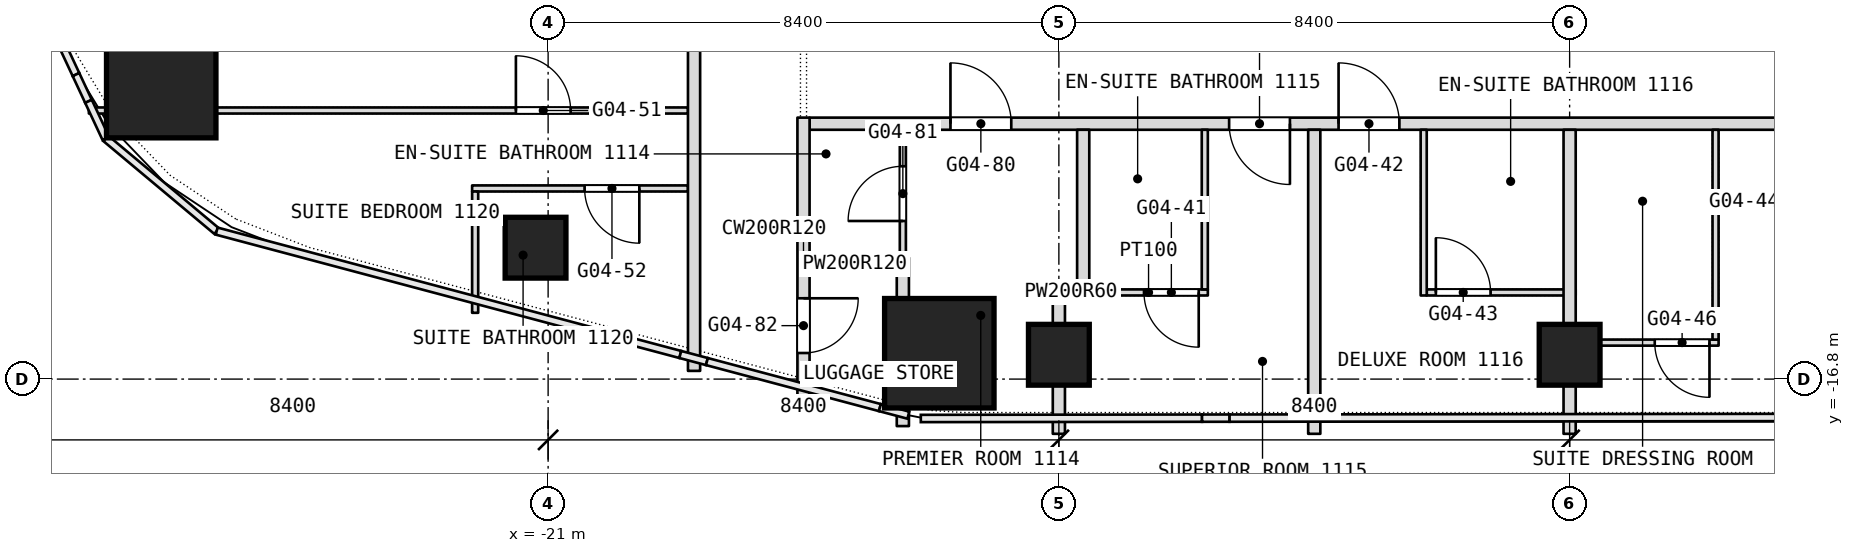
"""IFC4 building model, lengths in metres.
Left out: names, types, materials, properties, quantities, classifications, styles, units other than length and angle.
Written with IfcOpenShell. Run it as: python <this file> out.ifc"""

import sys

from ifc_helpers import new_model, si_unit, direction, frame, frame_2d, origin, origin_2d, place, context, subcontext, project, spatial, rectangle, extrude, element, fill, save


model = new_model("IFC4")
c1 = context("Model", 3, precision=1e-05, world=origin(), true_north=direction((0.0, 1.0)))
c2 = subcontext(c1, "Body", "Model", "MODEL_VIEW")
j1 = project(units=[si_unit("LENGTHUNIT", "METRE"), si_unit("PLANEANGLEUNIT", "RADIAN")], contexts=[c1])
p1 = place(None, origin())
s1 = spatial("IfcSite", under=j1, at=p1, CompositionType="ELEMENT")
p2 = place(p1, origin())
s2 = spatial("IfcBuilding", under=s1, at=p2, CompositionType="ELEMENT")
p3 = place(p2, frame((0.0, 0.0, 54.5)))
s3 = spatial("IfcBuildingStorey", under=s2, at=p3, CompositionType="ELEMENT", Elevation=54.5)
for number, where, z_axis, x_axis in (
    (1, (-27.363, -11.933, 0.0), (0.0, 0.0, 1.0), (1.0, 0.0, 0.0)),
    (2, (-14.566, -16.375, 0.0), (0.0, 0.0, 1.0), (1.0, 0.0, 0.0)),
):
    element("IfcColumn", number, at=place(p3, frame(where, z_axis=z_axis, x_axis=x_axis)), inside=s3, PredefinedType="COLUMN", context=c2, shape_type="SweptSolid", body=[
        extrude(rectangle(XDim=1.8, YDim=1.8, at=origin_2d()), origin(), (0.0, 0.0, 1.0), 3.6),
    ])
for number, where, z_axis, x_axis in (
    (3, (-4.2, -16.4, 0.0), (0.0, 0.0, 1.0), (1.0, 0.0, 0.0)),
    (4, (-12.6, -16.4, 0.0), (0.0, 0.0, 1.0), (1.0, 0.0, 0.0)),
    (5, (-21.207, -14.639, 0.0), (0.0, 0.0, 1.0), (1.0, 0.0, 0.0)),
):
    element("IfcColumn", number, at=place(p3, frame(where, z_axis=z_axis, x_axis=x_axis)), inside=s3, PredefinedType="COLUMN", context=c2, shape_type="SweptSolid", body=[
        extrude(rectangle(XDim=1.0, YDim=1.0, at=origin_2d()), origin(), (0.0, 0.0, 1.0), 3.6),
    ])
p4 = place(p3, frame((-4.1, -16.2, 0.0), z_axis=(0.0, 0.0, 1.0), x_axis=(1.0, 0.0, 0.0)))
e6 = element("IfcWall", 6, at=p4, inside=s3, PredefinedType="PARTITIONING", context=c2, shape_type="SweptSolid", body=[
    extrude(rectangle(XDim=2.35, YDim=0.1, at=frame_2d((1.175, 0.0))), origin(), (0.0, 0.0, 1.0), 2.94),
])
p5 = place(p4, frame((1.3, 0.0, 0.0)))
e7 = element("IfcOpeningElement", 7, at=p5, cuts=e6, PredefinedType="OPENING", context=c2, shape_type="SweptSolid", body=[
    extrude(rectangle(XDim=0.9, YDim=2.1, at=frame_2d((0.45, 1.05))), frame((0.0, 0.05, 0.0), z_axis=(0.0, -1.0, 0.0), x_axis=(1.0, 0.0, 0.0)), (0.0, 0.0, 1.0), 0.1),
])
p6 = place(p3, frame((-12.7, -15.375, 0.0), z_axis=(0.0, 0.0, 1.0), x_axis=(1.0, 0.0, 0.0)))
e8 = element("IfcWall", 8, at=p6, inside=s3, PredefinedType="PARTITIONING", context=c2, shape_type="SweptSolid", body=[
    extrude(rectangle(XDim=0.6, YDim=0.2, at=frame_2d((0.3, 0.0))), origin(), (0.0, 0.0, 1.0), 3.34),
])
p7 = place(p3, frame((-12.1, -15.375, 0.0), z_axis=(0.0, 0.0, 1.0), x_axis=(1.0, 0.0, 0.0)))
e9 = element("IfcWall", 9, at=p7, inside=s3, PredefinedType="PARTITIONING", context=c2, shape_type="SweptSolid", body=[
    extrude(rectangle(XDim=1.95, YDim=0.1, at=frame_2d((0.975, 0.0))), origin(), (0.0, 0.0, 1.0), 3.34),
])
p8 = place(p7, frame((0.9, 0.0, 0.0)))
e10 = element("IfcOpeningElement", 10, at=p8, cuts=e9, PredefinedType="OPENING", context=c2, shape_type="SweptSolid", body=[
    extrude(rectangle(XDim=0.9, YDim=2.1, at=frame_2d((0.45, 1.05))), frame((0.0, 0.05, 0.0), z_axis=(0.0, -1.0, 0.0), x_axis=(1.0, 0.0, 0.0)), (0.0, 0.0, 1.0), 0.1),
])
p9 = place(p3, frame((-6.55, -15.375, 0.0), z_axis=(0.0, 0.0, 1.0), x_axis=(1.0, 0.0, 0.0)))
e11 = element("IfcWall", 11, at=p9, inside=s3, PredefinedType="PARTITIONING", context=c2, shape_type="SweptSolid", body=[
    extrude(rectangle(XDim=2.45, YDim=0.1, at=frame_2d((1.225, 0.0))), origin(), (0.0, 0.0, 1.0), 3.34),
])
p10 = place(p9, frame((0.15, 0.0, 0.0)))
e12 = element("IfcOpeningElement", 12, at=p10, cuts=e11, PredefinedType="OPENING", context=c2, shape_type="SweptSolid", body=[
    extrude(rectangle(XDim=0.9, YDim=2.1, at=frame_2d((0.45, 1.05))), frame((0.0, 0.05, 0.0), z_axis=(0.0, -1.0, 0.0), x_axis=(1.0, 0.0, 0.0)), (0.0, 0.0, 1.0), 0.1),
])
p11 = place(p3, frame((-16.7, -14.9, 0.0), z_axis=(0.0, 0.0, 1.0), x_axis=(1.0, 0.0, 0.0)))
e13 = element("IfcWall", 13, at=p11, inside=s3, PredefinedType="PARTITIONING", context=c2, shape_type="SweptSolid", body=[
    extrude(rectangle(XDim=1.484, YDim=0.2, at=frame_2d((0.742, 0.0))), origin(), (0.0, 0.0, 1.0), 3.34),
])
p12 = place(p3, frame((-22.25, -13.665, 0.0), z_axis=(0.0, 0.0, 1.0), x_axis=(1.0, 0.0, 0.0)))
e14 = element("IfcWall", 14, at=p12, inside=s3, PredefinedType="PARTITIONING", context=c2, shape_type="SweptSolid", body=[
    extrude(rectangle(XDim=3.55, YDim=0.1, at=frame_2d((1.775, 0.0))), origin(), (0.0, 0.0, 1.0), 3.34),
])
p13 = place(p12, frame((1.85, 0.0, 0.0)))
e15 = element("IfcOpeningElement", 15, at=p13, cuts=e14, PredefinedType="OPENING", context=c2, shape_type="SweptSolid", body=[
    extrude(rectangle(XDim=0.9, YDim=2.1, at=frame_2d((0.45, 1.05))), frame((0.0, 0.05, 0.0), z_axis=(0.0, -1.0, 0.0), x_axis=(1.0, 0.0, 0.0)), (0.0, 0.0, 1.0), 0.1),
])
p14 = place(p3, frame((-16.7, -12.6, 0.0), z_axis=(0.0, 0.0, 1.0), x_axis=(1.0, 0.0, 0.0)))
e16 = element("IfcWall", 16, at=p14, inside=s3, PredefinedType="PARTITIONING", context=c2, shape_type="SweptSolid", body=[
    extrude(rectangle(XDim=33.4, YDim=0.2, at=frame_2d((16.7, 0.0))), origin(), (0.0, 0.0, 1.0), 3.34),
])
p15 = place(p14, frame((6.9, 0.0, 0.0)))
e17 = element("IfcOpeningElement", 17, at=p15, cuts=e16, PredefinedType="OPENING", context=c2, shape_type="SweptSolid", body=[
    extrude(rectangle(XDim=1.0, YDim=2.1, at=frame_2d((0.5, 1.05))), frame((0.0, 0.1, 0.0), z_axis=(0.0, -1.0, 0.0), x_axis=(1.0, 0.0, 0.0)), (0.0, 0.0, 1.0), 0.2),
])
p16 = place(p14, frame((8.7, 0.0, 0.0)))
e18 = element("IfcOpeningElement", 18, at=p16, cuts=e16, PredefinedType="OPENING", context=c2, shape_type="SweptSolid", body=[
    extrude(rectangle(XDim=1.0, YDim=2.1, at=frame_2d((0.5, 1.05))), frame((0.0, 0.1, 0.0), z_axis=(0.0, -1.0, 0.0), x_axis=(1.0, 0.0, 0.0)), (0.0, 0.0, 1.0), 0.2),
])
p17 = place(p14, frame((16.1, 0.0, 0.0)))
e19 = element("IfcOpeningElement", 19, at=p17, cuts=e16, PredefinedType="OPENING", context=c2, shape_type="SweptSolid", body=[
    extrude(rectangle(XDim=1.1, YDim=2.1, at=frame_2d((0.55, 1.05))), frame((0.0, 0.1, 0.0), z_axis=(0.0, -1.0, 0.0), x_axis=(1.0, 0.0, 0.0)), (0.0, 0.0, 1.0), 0.2),
])
p18 = place(p14, frame((24.6, 0.0, 0.0)))
e20 = element("IfcOpeningElement", 20, at=p18, cuts=e16, PredefinedType="OPENING", context=c2, shape_type="SweptSolid", body=[
    extrude(rectangle(XDim=1.1, YDim=2.1, at=frame_2d((0.55, 1.05))), frame((0.0, 0.1, 0.0), z_axis=(0.0, -1.0, 0.0), x_axis=(1.0, 0.0, 0.0)), (0.0, 0.0, 1.0), 0.2),
])
p19 = place(p14, frame((2.317, 0.0, 0.0)))
e21 = element("IfcOpeningElement", 21, at=p19, cuts=e16, PredefinedType="OPENING", context=c2, shape_type="SweptSolid", body=[
    extrude(rectangle(XDim=1.0, YDim=2.1, at=frame_2d((0.5, 1.05))), frame((0.0, 0.1, 0.0), z_axis=(0.0, -1.0, 0.0), x_axis=(1.0, 0.0, 0.0)), (0.0, 0.0, 1.0), 0.2),
])
p20 = place(p14, frame((30.033, 0.0, 0.0)))
e22 = element("IfcOpeningElement", 22, at=p20, cuts=e16, PredefinedType="OPENING", context=c2, shape_type="SweptSolid", body=[
    extrude(rectangle(XDim=1.0, YDim=2.1, at=frame_2d((0.5, 1.05))), frame((0.0, 0.1, 0.0), z_axis=(0.0, -1.0, 0.0), x_axis=(1.0, 0.0, 0.0)), (0.0, 0.0, 1.0), 0.2),
])
p21 = place(p3, frame((-28.553, -12.383, 0.0), z_axis=(0.0, 0.0, 1.0), x_axis=(1.0, 0.0, 0.0)))
e23 = element("IfcWall", 23, at=p21, inside=s3, PredefinedType="PARTITIONING", context=c2, shape_type="SweptSolid", body=[
    extrude(rectangle(XDim=0.29, YDim=0.1, at=frame_2d((0.145, 0.0))), origin(), (0.0, 0.0, 1.0), 3.34),
])
p22 = place(p3, frame((-26.463, -12.383, 0.0), z_axis=(0.0, 0.0, 1.0), x_axis=(1.0, 0.0, 0.0)))
e24 = element("IfcWall", 24, at=p22, inside=s3, PredefinedType="PARTITIONING", context=c2, shape_type="SweptSolid", body=[
    extrude(rectangle(XDim=7.763, YDim=0.1, at=frame_2d((3.881, 0.0))), origin(), (0.0, 0.0, 1.0), 3.34),
])
p23 = place(p22, frame((4.933, 0.0, 0.0)))
e25 = element("IfcOpeningElement", 25, at=p23, cuts=e24, PredefinedType="OPENING", context=c2, shape_type="SweptSolid", body=[
    extrude(rectangle(XDim=0.9, YDim=2.1, at=frame_2d((0.45, 1.05))), frame((0.0, 0.05, 0.0), z_axis=(0.0, -1.0, 0.0), x_axis=(1.0, 0.0, 0.0)), (0.0, 0.0, 1.0), 0.1),
])
p24 = place(p3, frame((-1.8, -16.15, 0.0), z_axis=(0.0, 0.0, 1.0), x_axis=(0.0, 1.0, 0.0)))
e26 = element("IfcWall", 26, at=p24, inside=s3, PredefinedType="PARTITIONING", context=c2, shape_type="SweptSolid", body=[
    extrude(rectangle(XDim=3.45, YDim=0.1, at=frame_2d((1.725, 0.0))), origin(), (0.0, 0.0, 1.0), 3.34),
])
p25 = place(p3, frame((-4.2, -17.7, 0.0), z_axis=(0.0, 0.0, 1.0), x_axis=(0.0, 1.0, 0.0)))
e27 = element("IfcWall", 27, at=p25, inside=s3, PredefinedType="PARTITIONING", context=c2, shape_type="SweptSolid", body=[
    extrude(rectangle(XDim=5.0, YDim=0.2, at=frame_2d((2.5, 0.0))), origin(), (0.0, 0.0, 1.0), 3.34),
])
p26 = place(p3, frame((-6.6, -15.425, 0.0), z_axis=(0.0, 0.0, 1.0), x_axis=(0.0, 1.0, 0.0)))
e28 = element("IfcWall", 28, at=p26, inside=s3, PredefinedType="PARTITIONING", context=c2, shape_type="SweptSolid", body=[
    extrude(rectangle(XDim=2.725, YDim=0.1, at=frame_2d((1.363, 0.0))), origin(), (0.0, 0.0, 1.0), 3.34),
])
p27 = place(p3, frame((-8.4, -17.7, 0.0), z_axis=(0.0, 0.0, 1.0), x_axis=(0.0, 1.0, 0.0)))
e29 = element("IfcWall", 29, at=p27, inside=s3, PredefinedType="PARTITIONING", context=c2, shape_type="SweptSolid", body=[
    extrude(rectangle(XDim=5.0, YDim=0.2, at=frame_2d((2.5, 0.0))), origin(), (0.0, 0.0, 1.0), 3.34),
])
p28 = place(p3, frame((-10.2, -15.325, 0.0), z_axis=(0.0, 0.0, 1.0), x_axis=(0.0, 1.0, 0.0)))
e30 = element("IfcWall", 30, at=p28, inside=s3, PredefinedType="PARTITIONING", context=c2, shape_type="SweptSolid", body=[
    extrude(rectangle(XDim=2.625, YDim=0.1, at=frame_2d((1.312, 0.0))), origin(), (0.0, 0.0, 1.0), 3.34),
])
p29 = place(p3, frame((-12.2, -15.275, 0.0), z_axis=(0.0, 0.0, 1.0), x_axis=(0.0, 1.0, 0.0)))
e31 = element("IfcWall", 31, at=p29, inside=s3, PredefinedType="PARTITIONING", context=c2, shape_type="SweptSolid", body=[
    extrude(rectangle(XDim=2.575, YDim=0.2, at=frame_2d((1.288, 0.0))), origin(), (0.0, 0.0, 1.0), 3.34),
])
p30 = place(p3, frame((-12.6, -17.7, 0.0), z_axis=(0.0, 0.0, 1.0), x_axis=(0.0, 1.0, 0.0)))
e32 = element("IfcWall", 32, at=p30, inside=s3, PredefinedType="PARTITIONING", context=c2, shape_type="SweptSolid", body=[
    extrude(rectangle(XDim=2.225, YDim=0.2, at=frame_2d((1.112, 0.0))), origin(), (0.0, 0.0, 1.0), 3.34),
])
p31 = place(p3, frame((-15.166, -17.573, 0.0), z_axis=(0.0, 0.0, 1.0), x_axis=(0.0, 1.0, 0.0)))
e33 = element("IfcWall", 33, at=p31, inside=s3, PredefinedType="PARTITIONING", context=c2, shape_type="SweptSolid", body=[
    extrude(rectangle(XDim=0.298, YDim=0.2, at=frame_2d((0.149, 0.0))), origin(), (0.0, 0.0, 1.0), 3.34),
])
p32 = place(p3, frame((-15.166, -15.475, 0.0), z_axis=(0.0, 0.0, 1.0), x_axis=(0.0, 1.0, 0.0)))
e34 = element("IfcWall", 34, at=p32, inside=s3, PredefinedType="PARTITIONING", context=c2, shape_type="SweptSolid", body=[
    extrude(rectangle(XDim=0.675, YDim=0.2, at=frame_2d((0.337, 0.0))), origin(), (0.0, 0.0, 1.0), 3.34),
])
p33 = place(p3, frame((-15.166, -15.0, 0.0), z_axis=(0.0, 0.0, 1.0), x_axis=(0.0, 1.0, 0.0)))
e35 = element("IfcWall", 35, at=p33, inside=s3, PredefinedType="PARTITIONING", context=c2, shape_type="SweptSolid", body=[
    extrude(rectangle(XDim=2.3, YDim=0.1, at=frame_2d((1.15, 0.0))), origin(), (0.0, 0.0, 1.0), 3.34),
])
p34 = place(p33, frame((0.8, 0.0, 0.0)))
e36 = element("IfcOpeningElement", 36, at=p34, cuts=e35, PredefinedType="OPENING", context=c2, shape_type="SweptSolid", body=[
    extrude(rectangle(XDim=0.9, YDim=2.1, at=frame_2d((0.45, 1.05))), frame((0.0, 0.05, 0.0), z_axis=(0.0, -1.0, 0.0), x_axis=(1.0, 0.0, 0.0)), (0.0, 0.0, 1.0), 0.1),
])
p35 = place(p3, frame((-16.8, -17.143, 0.0), z_axis=(0.0, 0.0, 1.0), x_axis=(0.0, 1.0, 0.0)))
e37 = element("IfcWall", 37, at=p35, inside=s3, PredefinedType="PARTITIONING", context=c2, shape_type="SweptSolid", body=[
    extrude(rectangle(XDim=4.643, YDim=0.2, at=frame_2d((2.322, 0.0))), origin(), (0.0, 0.0, 1.0), 3.34),
])
p36 = place(p35, frame((0.772, 0.0, 0.0)))
e38 = element("IfcOpeningElement", 38, at=p36, cuts=e37, PredefinedType="OPENING", context=c2, shape_type="SweptSolid", body=[
    extrude(rectangle(XDim=0.9, YDim=2.1, at=frame_2d((0.45, 1.05))), frame((0.0, 0.1, 0.0), z_axis=(0.0, -1.0, 0.0), x_axis=(1.0, 0.0, 0.0)), (0.0, 0.0, 1.0), 0.2),
])
p37 = place(p3, frame((-18.6, -16.665, 0.0), z_axis=(0.0, 0.0, 1.0), x_axis=(0.0, 1.0, 0.0)))
e39 = element("IfcWall", 39, at=p37, inside=s3, PredefinedType="PARTITIONING", context=c2, shape_type="SweptSolid", body=[
    extrude(rectangle(XDim=23.565, YDim=0.2, at=frame_2d((11.782, 0.0))), origin(), (0.0, 0.0, 1.0), 3.34),
])
p38 = place(p37, frame((5.724, 0.0, 0.0)))
e40 = element("IfcOpeningElement", 40, at=p38, cuts=e39, PredefinedType="OPENING", context=c2, shape_type="SweptSolid", body=[
    extrude(rectangle(XDim=1.1, YDim=2.1, at=frame_2d((0.55, 1.05))), frame((0.0, 0.1, 0.0), z_axis=(0.0, -1.0, 0.0), x_axis=(1.0, 0.0, 0.0)), (0.0, 0.0, 1.0), 0.2),
])
p39 = place(p37, frame((8.665, 0.0, 0.0)))
e41 = element("IfcOpeningElement", 41, at=p39, cuts=e39, PredefinedType="OPENING", context=c2, shape_type="SweptSolid", body=[
    extrude(rectangle(XDim=1.0, YDim=2.1, at=frame_2d((0.5, 1.05))), frame((0.0, 0.1, 0.0), z_axis=(0.0, -1.0, 0.0), x_axis=(1.0, 0.0, 0.0)), (0.0, 0.0, 1.0), 0.2),
])
p40 = place(p37, frame((15.265, 0.0, 0.0)))
e42 = element("IfcOpeningElement", 42, at=p40, cuts=e39, PredefinedType="OPENING", context=c2, shape_type="SweptSolid", body=[
    extrude(rectangle(XDim=1.0, YDim=2.1, at=frame_2d((0.5, 1.05))), frame((0.0, 0.1, 0.0), z_axis=(0.0, -1.0, 0.0), x_axis=(1.0, 0.0, 0.0)), (0.0, 0.0, 1.0), 0.2),
])
p41 = place(p37, frame((19.465, 0.0, 0.0)))
e43 = element("IfcOpeningElement", 43, at=p41, cuts=e39, PredefinedType="OPENING", context=c2, shape_type="SweptSolid", body=[
    extrude(rectangle(XDim=1.0, YDim=2.1, at=frame_2d((0.5, 1.05))), frame((0.0, 0.1, 0.0), z_axis=(0.0, -1.0, 0.0), x_axis=(1.0, 0.0, 0.0)), (0.0, 0.0, 1.0), 0.2),
])
p42 = place(p3, frame((-22.2, -15.71, 0.0), z_axis=(0.0, 0.0, 1.0), x_axis=(0.0, 1.0, 0.0)))
e44 = element("IfcWall", 44, at=p42, inside=s3, PredefinedType="PARTITIONING", context=c2, shape_type="SweptSolid", body=[
    extrude(rectangle(XDim=1.995, YDim=0.1, at=frame_2d((0.998, 0.0))), origin(), (0.0, 0.0, 1.0), 3.34),
])
p43 = place(p5, origin())
e45 = element("IfcDoor", 45, at=p43, inside=s3, OperationType="SINGLE_SWING_RIGHT", PredefinedType="DOOR", context=c2, shape_type="SweptSolid", body=[
    extrude(rectangle(XDim=0.9, YDim=2.1, at=frame_2d((0.45, 1.05))), frame((0.0, 0.025, 0.0), z_axis=(0.0, -1.0, 0.0), x_axis=(1.0, 0.0, 0.0)), (0.0, 0.0, 1.0), 0.05),
])
fill(e7, e45)
p44 = place(p8, origin())
e46 = element("IfcDoor", 46, at=p44, inside=s3, OperationType="SINGLE_SWING_RIGHT", PredefinedType="DOOR", context=c2, shape_type="SweptSolid", body=[
    extrude(rectangle(XDim=0.9, YDim=2.1, at=frame_2d((0.45, 1.05))), frame((0.0, 0.025, 0.0), z_axis=(0.0, -1.0, 0.0), x_axis=(1.0, 0.0, 0.0)), (0.0, 0.0, 1.0), 0.05),
])
fill(e10, e46)
p45 = place(p10, origin())
e47 = element("IfcDoor", 47, at=p45, inside=s3, OperationType="SINGLE_SWING_LEFT", PredefinedType="DOOR", context=c2, shape_type="SweptSolid", body=[
    extrude(rectangle(XDim=0.9, YDim=2.1, at=frame_2d((0.45, 1.05))), frame((0.0, 0.025, 0.0), z_axis=(0.0, -1.0, 0.0), x_axis=(1.0, 0.0, 0.0)), (0.0, 0.0, 1.0), 0.05),
])
fill(e12, e47)
p46 = place(p13, origin())
e48 = element("IfcDoor", 48, at=p46, inside=s3, OperationType="SINGLE_SWING_RIGHT", PredefinedType="DOOR", context=c2, shape_type="SweptSolid", body=[
    extrude(rectangle(XDim=0.9, YDim=2.1, at=frame_2d((0.45, 1.05))), frame((0.0, 0.025, 0.0), z_axis=(0.0, -1.0, 0.0), x_axis=(1.0, 0.0, 0.0)), (0.0, 0.0, 1.0), 0.05),
])
fill(e15, e48)
p47 = place(p15, origin())
e49 = element("IfcDoor", 49, at=p47, inside=s3, OperationType="SINGLE_SWING_RIGHT", PredefinedType="DOOR", context=c2, shape_type="SweptSolid", body=[
    extrude(rectangle(XDim=1.0, YDim=2.1, at=frame_2d((0.5, 1.05))), frame((0.0, 0.025, 0.0), z_axis=(0.0, -1.0, 0.0), x_axis=(1.0, 0.0, 0.0)), (0.0, 0.0, 1.0), 0.05),
])
fill(e17, e49)
p48 = place(p16, origin())
e50 = element("IfcDoor", 50, at=p48, inside=s3, OperationType="SINGLE_SWING_RIGHT", PredefinedType="DOOR", context=c2, shape_type="SweptSolid", body=[
    extrude(rectangle(XDim=1.0, YDim=2.1, at=frame_2d((0.5, 1.05))), frame((0.0, 0.025, 0.0), z_axis=(0.0, -1.0, 0.0), x_axis=(1.0, 0.0, 0.0)), (0.0, 0.0, 1.0), 0.05),
])
fill(e18, e50)
p49 = place(p19, origin())
e51 = element("IfcDoor", 51, at=p49, inside=s3, OperationType="SINGLE_SWING_RIGHT", PredefinedType="DOOR", context=c2, shape_type="SweptSolid", body=[
    extrude(rectangle(XDim=1.0, YDim=2.1, at=frame_2d((0.5, 1.05))), frame((0.0, 0.025, 0.0), z_axis=(0.0, -1.0, 0.0), x_axis=(1.0, 0.0, 0.0)), (0.0, 0.0, 1.0), 0.05),
])
fill(e21, e51)
p50 = place(p23, origin())
e52 = element("IfcDoor", 52, at=p50, inside=s3, OperationType="SINGLE_SWING_LEFT", PredefinedType="DOOR", context=c2, shape_type="SweptSolid", body=[
    extrude(rectangle(XDim=0.9, YDim=2.1, at=frame_2d((0.45, 1.05))), frame((0.0, 0.025, 0.0), z_axis=(0.0, -1.0, 0.0), x_axis=(1.0, 0.0, 0.0)), (0.0, 0.0, 1.0), 0.05),
])
fill(e25, e52)
p51 = place(p34, origin())
e53 = element("IfcDoor", 53, at=p51, inside=s3, OperationType="SINGLE_SWING_RIGHT", PredefinedType="DOOR", context=c2, shape_type="SweptSolid", body=[
    extrude(rectangle(XDim=0.9, YDim=2.1, at=frame_2d((0.45, 1.05))), frame((0.0, 0.025, 0.0), z_axis=(0.0, -1.0, 0.0), x_axis=(1.0, 0.0, 0.0)), (0.0, 0.0, 1.0), 0.05),
])
fill(e36, e53)
p52 = place(p36, origin())
e54 = element("IfcDoor", 54, at=p52, inside=s3, OperationType="SINGLE_SWING_LEFT", PredefinedType="DOOR", context=c2, shape_type="SweptSolid", body=[
    extrude(rectangle(XDim=0.9, YDim=2.1, at=frame_2d((0.45, 1.05))), frame((0.0, 0.025, 0.0), z_axis=(0.0, -1.0, 0.0), x_axis=(1.0, 0.0, 0.0)), (0.0, 0.0, 1.0), 0.05),
])
fill(e38, e54)
save(model, sys.argv[1])
